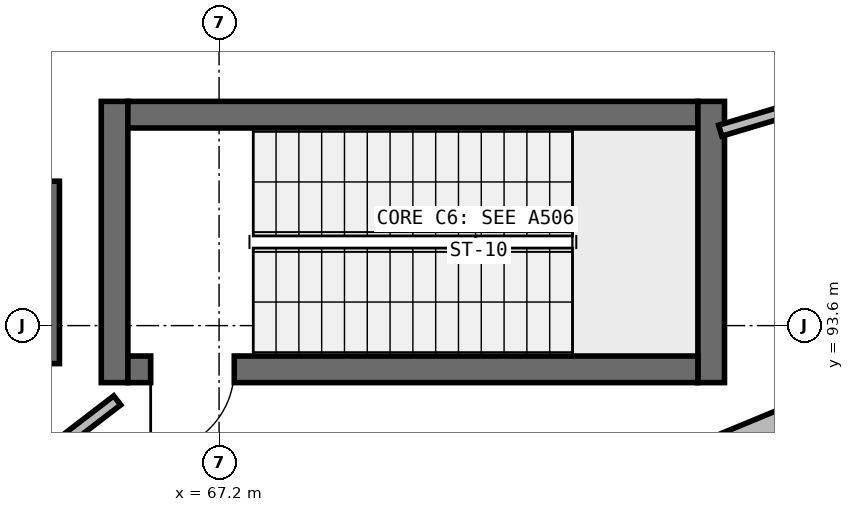
"""IFC4 building model, lengths in metres.
Left out: names, types, materials, properties, quantities, classifications, styles, units other than length and angle.
Written with IfcOpenShell. Run it as: python <this file> out.ifc"""

import sys

from ifc_helpers import new_model, si_unit, direction, frame, frame_2d, origin, place, context, subcontext, project, spatial, rectangle, extrude, element, fill, save


model = new_model("IFC4")
c1 = context("Model", 3, precision=1e-05, world=origin(), true_north=direction((0.0, 1.0)))
c2 = subcontext(c1, "Body", "Model", "MODEL_VIEW")
j1 = project(units=[si_unit("LENGTHUNIT", "METRE"), si_unit("PLANEANGLEUNIT", "RADIAN")], contexts=[c1])
p1 = place(None, origin())
s1 = spatial("IfcSite", under=j1, at=p1, CompositionType="ELEMENT")
p2 = place(p1, origin())
s2 = spatial("IfcBuilding", under=s1, at=p2, CompositionType="ELEMENT")
p3 = place(p2, origin())
s3 = spatial("IfcBuildingStorey", under=s2, at=p3, CompositionType="ELEMENT", Elevation=0.0)
p4 = place(p3, frame((65.825, 92.85, 0.0), z_axis=(0.0, 0.0, 1.0), x_axis=(0.0, 1.0, 0.0)))
e1 = element("IfcWall", 1, at=p4, inside=s3, PredefinedType="SHEAR", context=c2, shape_type="SweptSolid", body=[
    extrude(rectangle(XDim=3.7, YDim=0.35, at=frame_2d((1.85, 0.0))), origin(), (0.0, 0.0, 1.0), 5.25),
])
p5 = place(p3, frame((66.0, 96.375, 0.0), z_axis=(0.0, 0.0, 1.0), x_axis=(1.0, 0.0, 0.0)))
e2 = element("IfcWall", 2, at=p5, inside=s3, PredefinedType="SHEAR", context=c2, shape_type="SweptSolid", body=[
    extrude(rectangle(XDim=7.5, YDim=0.35, at=frame_2d((3.75, 0.0))), origin(), (0.0, 0.0, 1.0), 5.25),
])
p6 = place(p3, frame((73.675, 96.55, 0.0), z_axis=(0.0, 0.0, 1.0), x_axis=(0.0, -1.0, 0.0)))
e3 = element("IfcWall", 3, at=p6, inside=s3, PredefinedType="SHEAR", context=c2, shape_type="SweptSolid", body=[
    extrude(rectangle(XDim=3.7, YDim=0.35, at=frame_2d((1.85, 0.0))), origin(), (0.0, 0.0, 1.0), 5.25),
])
p7 = place(p3, frame((73.5, 93.025, 0.0), z_axis=(0.0, 0.0, 1.0), x_axis=(-1.0, 0.0, 0.0)))
e4 = element("IfcWall", 4, at=p7, inside=s3, PredefinedType="SHEAR", context=c2, shape_type="SweptSolid", body=[
    extrude(rectangle(XDim=7.5, YDim=0.35, at=frame_2d((3.75, 0.0))), origin(), (0.0, 0.0, 1.0), 5.25),
])
p8 = place(p7, frame((6.1, 0.0, 0.0)))
e5 = element("IfcOpeningElement", 5, at=p8, cuts=e4, PredefinedType="OPENING", context=c2, shape_type="SweptSolid", body=[
    extrude(rectangle(XDim=1.1, YDim=2.15, at=frame_2d((0.55, 1.075))), frame((0.0, 0.185, 0.0), z_axis=(0.0, -1.0, 0.0), x_axis=(1.0, 0.0, 0.0)), (0.0, 0.0, 1.0), 0.37),
])
p9 = place(p3, frame((64.95, 95.5, 0.0), z_axis=(0.0, 0.0, 1.0), x_axis=(0.0, -1.0, 0.0)))
e6 = element("IfcWall", 6, at=p9, inside=s3, PredefinedType="SHEAR", context=c2, shape_type="SweptSolid", body=[
    extrude(rectangle(XDim=2.4, YDim=0.3, at=frame_2d((1.2, 0.0))), origin(), (0.0, 0.0, 1.0), 5.07),
])
p10 = place(p3, frame((76.988, 93.341, 0.0), z_axis=(0.0, 0.0, 1.0), x_axis=(-0.92385889973, -0.382733240508, 0.0)))
e7 = element("IfcWall", 7, at=p10, inside=s3, PredefinedType="SOLIDWALL", context=c2, shape_type="SweptSolid", body=[
    extrude(rectangle(XDim=10.081, YDim=0.29, at=frame_2d((5.04, 0.0))), origin(), (0.0, 0.0, 1.0), 5.07),
])
p11 = place(p10, frame((3.69, 0.0, 0.95)))
e8 = element("IfcOpeningElement", 8, at=p11, cuts=e7, PredefinedType="OPENING", context=c2, shape_type="SweptSolid", body=[
    extrude(rectangle(XDim=2.7, YDim=1.67, at=frame_2d((1.35, 0.835))), frame((0.0, 0.155, 0.0), z_axis=(0.0, -1.0, 0.0), x_axis=(1.0, 0.0, 0.0)), (0.0, 0.0, 1.0), 0.31),
])
p12 = place(p3, frame((68.179, 88.607, 0.0), z_axis=(0.0, 0.0, 1.0), x_axis=(0.923848052238, 0.382759423628, 0.0)))
e9 = element("IfcWall", 9, at=p12, inside=s3, PredefinedType="SOLIDWALL", context=c2, shape_type="SweptSolid", body=[
    extrude(rectangle(XDim=9.821, YDim=0.29, at=frame_2d((4.91, 0.0))), origin(), (0.0, 0.0, 1.0), 5.07),
])
p13 = place(p12, frame((1.27, 0.0, 0.95)))
e10 = element("IfcOpeningElement", 10, at=p13, cuts=e9, PredefinedType="OPENING", context=c2, shape_type="SweptSolid", body=[
    extrude(rectangle(XDim=2.37, YDim=1.8, at=frame_2d((1.185, 0.9))), frame((0.0, 0.155, 0.0), z_axis=(0.0, -1.0, 0.0), x_axis=(1.0, 0.0, 0.0)), (0.0, 0.0, 1.0), 0.31),
])
p14 = place(p12, frame((6.181, 0.0, 0.95)))
e11 = element("IfcOpeningElement", 11, at=p14, cuts=e9, PredefinedType="OPENING", context=c2, shape_type="SweptSolid", body=[
    extrude(rectangle(XDim=2.37, YDim=1.8, at=frame_2d((1.185, 0.9))), frame((0.0, 0.155, 0.0), z_axis=(0.0, -1.0, 0.0), x_axis=(1.0, 0.0, 0.0)), (0.0, 0.0, 1.0), 0.31),
])
p15 = place(p3, frame((76.057, 96.839, 0.0), z_axis=(0.0, 0.0, 1.0), x_axis=(-0.95838508169, -0.285478607244, 0.0)))
e12 = element("IfcWall", 12, at=p15, inside=s3, PredefinedType="PARTITIONING", context=c2, shape_type="SweptSolid", body=[
    extrude(rectangle(XDim=2.361, YDim=0.15, at=frame_2d((1.181, 0.0))), origin(), (0.0, 0.0, 1.0), 4.438),
])
p16 = place(p3, frame((65.86, 92.616, 0.0), z_axis=(0.0, 0.0, 1.0), x_axis=(-0.793301872689, -0.608828497024, 0.0)))
e13 = element("IfcWall", 13, at=p16, inside=s3, PredefinedType="PARTITIONING", context=c2, shape_type="SweptSolid", body=[
    extrude(rectangle(XDim=11.038, YDim=0.15, at=frame_2d((5.519, 0.0))), origin(), (0.0, 0.0, 1.0), 4.438),
])
p17 = place(p16, frame((4.95, 0.0, 0.0)))
e14 = element("IfcOpeningElement", 14, at=p17, cuts=e13, PredefinedType="OPENING", context=c2, shape_type="SweptSolid", body=[
    extrude(rectangle(XDim=1.1, YDim=2.2, at=frame_2d((0.55, 1.1))), frame((0.0, 0.085, 0.0), z_axis=(0.0, -1.0, 0.0), x_axis=(1.0, 0.0, 0.0)), (0.0, 0.0, 1.0), 0.17),
])
p18 = place(p3, frame((76.057, 96.839, 0.0), z_axis=(0.0, 0.0, 1.0), x_axis=(-0.258832719409, 0.965922162166, 0.0)))
e15 = element("IfcWall", 15, at=p18, inside=s3, PredefinedType="PARTITIONING", context=c2, shape_type="SweptSolid", body=[
    extrude(rectangle(XDim=6.44, YDim=0.15, at=frame_2d((3.22, 0.0))), origin(), (0.0, 0.0, 1.0), 4.438),
])
p19 = place(p8, origin())
e16 = element("IfcDoor", 16, at=p19, inside=s3, OperationType="SINGLE_SWING_RIGHT", PredefinedType="DOOR", context=c2, shape_type="SweptSolid", body=[
    extrude(rectangle(XDim=1.1, YDim=2.15, at=frame_2d((0.55, 1.075))), frame((0.0, 0.025, 0.0), z_axis=(0.0, -1.0, 0.0), x_axis=(1.0, 0.0, 0.0)), (0.0, 0.0, 1.0), 0.05),
])
fill(e5, e16)
save(model, sys.argv[1])
